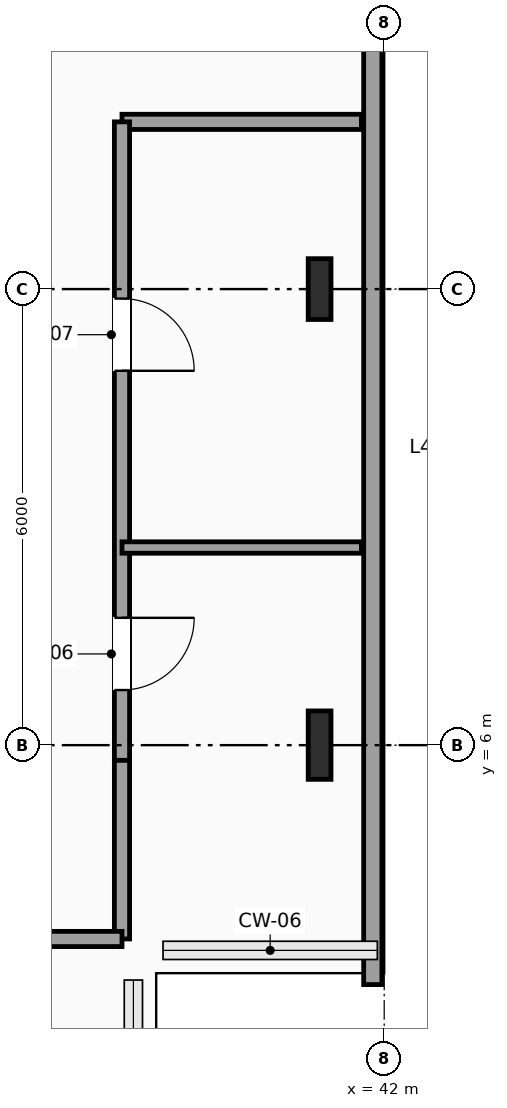
"""IFC4 building model, lengths in metres.
Left out: names, types, materials, properties, quantities, classifications, styles, units other than length and angle.
Written with IfcOpenShell. Run it as: python <this file> out.ifc"""

import sys

from ifc_helpers import new_model, si_unit, direction, frame, frame_2d, origin, origin_2d, place, context, subcontext, project, spatial, rectangle, i_section, extrude, element, fill, save


model = new_model("IFC4")
c1 = context("Model", 3, precision=1e-05, world=origin(), true_north=direction((0.0, 1.0)))
c2 = subcontext(c1, "Body", "Model", "MODEL_VIEW")
j1 = project(units=[si_unit("LENGTHUNIT", "METRE"), si_unit("PLANEANGLEUNIT", "RADIAN")], contexts=[c1])
p1 = place(None, origin())
s1 = spatial("IfcSite", under=j1, at=p1, CompositionType="ELEMENT")
p2 = place(p1, origin())
s2 = spatial("IfcBuilding", under=s1, at=p2, CompositionType="ELEMENT")
p3 = place(p2, frame((0.0, 0.0, 199.2)))
s3 = spatial("IfcBuildingStorey", under=s2, at=p3, CompositionType="ELEMENT", Elevation=199.2)
p4 = place(p3, frame((41.15, 6.0, 0.0), z_axis=(0.0, 0.0, 1.0), x_axis=(1.0, 0.0, 0.0)))
e1 = element("IfcColumn", 1, at=p4, inside=s3, PredefinedType="COLUMN", context=c2, shape_type="SweptSolid", body=[
    extrude(i_section(OverallWidth=0.3, OverallDepth=0.9, WebThickness=0.019, FlangeThickness=0.035, FilletRadius=0.03, at=origin_2d()), origin(), (0.0, 0.0, 1.0), 4.8),
])
p5 = place(p3, frame((41.15, 12.0, 0.0), z_axis=(0.0, 0.0, 1.0), x_axis=(1.0, 0.0, 0.0)))
e2 = element("IfcColumn", 2, at=p5, inside=s3, PredefinedType="COLUMN", context=c2, shape_type="SweptSolid", body=[
    extrude(i_section(OverallWidth=0.3, OverallDepth=0.8, WebThickness=0.018, FlangeThickness=0.033, FilletRadius=0.03, at=origin_2d()), origin(), (0.0, 0.0, 1.0), 4.8),
])
p6 = place(p3, frame((41.85, 21.15, 0.0), z_axis=(0.0, 0.0, 1.0), x_axis=(0.0, -1.0, 0.0)))
e3 = element("IfcWall", 3, at=p6, inside=s3, PredefinedType="SOLIDWALL", context=c2, shape_type="SweptSolid", body=[
    extrude(rectangle(XDim=18.3, YDim=0.24, at=frame_2d((9.15, 0.0))), origin(), (0.0, 0.0, 1.0), 4.5),
])
p7 = place(p3, frame((41.7, 14.2, 0.0), z_axis=(0.0, 0.0, 1.0), x_axis=(-1.0, 0.0, 0.0)))
e4 = element("IfcWall", 4, at=p7, inside=s3, PredefinedType="SOLIDWALL", context=c2, shape_type="SweptSolid", body=[
    extrude(rectangle(XDim=3.15, YDim=0.2, at=frame_2d((1.575, 0.0))), origin(), (0.0, 0.0, 1.0), 4.5),
])
p8 = place(p3, frame((38.55, 14.2, 0.0), z_axis=(0.0, 0.0, 1.0), x_axis=(0.0, -1.0, 0.0)))
e5 = element("IfcWall", 5, at=p8, inside=s3, PredefinedType="SOLIDWALL", context=c2, shape_type="SweptSolid", body=[
    extrude(rectangle(XDim=8.4, YDim=0.2, at=frame_2d((4.2, 0.0))), origin(), (0.0, 0.0, 1.0), 4.5),
])
p9 = place(p8, frame((6.525, 0.0, 0.0)))
e6 = element("IfcOpeningElement", 6, at=p9, cuts=e5, PredefinedType="OPENING", context=c2, shape_type="SweptSolid", body=[
    extrude(rectangle(XDim=0.95, YDim=2.15, at=frame_2d((0.475, 1.075))), frame((0.0, 0.11, 0.0), z_axis=(0.0, -1.0, 0.0), x_axis=(1.0, 0.0, 0.0)), (0.0, 0.0, 1.0), 0.22),
])
p10 = place(p8, frame((2.325, 0.0, 0.0)))
e7 = element("IfcOpeningElement", 7, at=p10, cuts=e5, PredefinedType="OPENING", context=c2, shape_type="SweptSolid", body=[
    extrude(rectangle(XDim=0.95, YDim=2.15, at=frame_2d((0.475, 1.075))), frame((0.0, 0.11, 0.0), z_axis=(0.0, -1.0, 0.0), x_axis=(1.0, 0.0, 0.0)), (0.0, 0.0, 1.0), 0.22),
])
p11 = place(p3, frame((38.55, 5.8, 0.0), z_axis=(0.0, 0.0, 1.0), x_axis=(0.0, -1.0, 0.0)))
e8 = element("IfcWall", 8, at=p11, inside=s3, PredefinedType="SOLIDWALL", context=c2, shape_type="SweptSolid", body=[
    extrude(rectangle(XDim=2.35, YDim=0.2, at=frame_2d((1.175, 0.0))), origin(), (0.0, 0.0, 1.0), 4.5),
])
p12 = place(p3, frame((38.55, 3.45, 0.0), z_axis=(0.0, 0.0, 1.0), x_axis=(-1.0, 0.0, 0.0)))
e9 = element("IfcWall", 9, at=p12, inside=s3, PredefinedType="SOLIDWALL", context=c2, shape_type="SweptSolid", body=[
    extrude(rectangle(XDim=2.4, YDim=0.2, at=frame_2d((1.2, 0.0))), origin(), (0.0, 0.0, 1.0), 4.5),
])
p13 = place(p3, frame((38.55, 8.6, 0.0), z_axis=(0.0, 0.0, 1.0), x_axis=(1.0, 0.0, 0.0)))
e10 = element("IfcWall", 10, at=p13, inside=s3, PredefinedType="PARTITIONING", context=c2, shape_type="SweptSolid", body=[
    extrude(rectangle(XDim=3.15, YDim=0.15, at=frame_2d((1.575, 0.0))), origin(), (0.0, 0.0, 1.0), 4.5),
])
p14 = place(p9, origin())
e11 = element("IfcDoor", 11, at=p14, inside=s3, OperationType="SINGLE_SWING_LEFT", PredefinedType="DOOR", context=c2, shape_type="SweptSolid", body=[
    extrude(rectangle(XDim=0.95, YDim=2.15, at=frame_2d((0.475, 1.075))), frame((0.0, 0.025, 0.0), z_axis=(0.0, -1.0, 0.0), x_axis=(1.0, 0.0, 0.0)), (0.0, 0.0, 1.0), 0.05),
])
fill(e6, e11)
p15 = place(p10, origin())
e12 = element("IfcDoor", 12, at=p15, inside=s3, OperationType="SINGLE_SWING_RIGHT", PredefinedType="DOOR", context=c2, shape_type="SweptSolid", body=[
    extrude(rectangle(XDim=0.95, YDim=2.15, at=frame_2d((0.475, 1.075))), frame((0.0, 0.025, 0.0), z_axis=(0.0, -1.0, 0.0), x_axis=(1.0, 0.0, 0.0)), (0.0, 0.0, 1.0), 0.05),
])
fill(e7, e12)
save(model, sys.argv[1])
